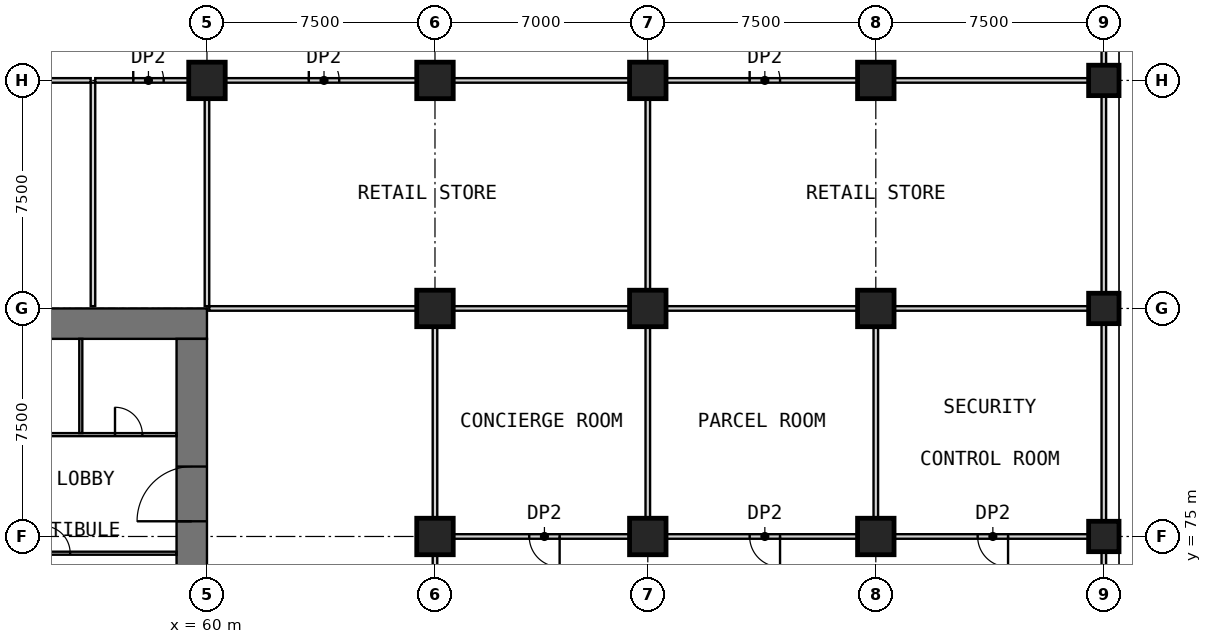
"""IFC4 building model, lengths in metres.
Left out: names, types, materials, properties, quantities, classifications, styles, units other than length and angle.
Written with IfcOpenShell. Run it as: python <this file> out.ifc"""

import sys

from ifc_helpers import new_model, si_unit, direction, frame, frame_2d, origin, origin_2d, place, context, subcontext, project, spatial, rectangle, extrude, element, fill, save


model = new_model("IFC4")
c1 = context("Model", 3, precision=1e-05, world=origin(), true_north=direction((0.0, 1.0)))
c2 = subcontext(c1, "Body", "Model", "MODEL_VIEW")
j1 = project(units=[si_unit("LENGTHUNIT", "METRE"), si_unit("PLANEANGLEUNIT", "RADIAN")], contexts=[c1])
p1 = place(None, origin())
s1 = spatial("IfcSite", under=j1, at=p1, CompositionType="ELEMENT")
p2 = place(p1, origin())
s2 = spatial("IfcBuilding", under=s1, at=p2, CompositionType="ELEMENT")
p3 = place(p2, origin())
s3 = spatial("IfcBuildingStorey", under=s2, at=p3, CompositionType="ELEMENT", Elevation=0.0)
for number, where, z_axis, x_axis in (
    (1, (60.0, 90.0, 0.0), (0.0, 0.0, 1.0), (1.0, 0.0, 0.0)),
    (2, (67.5, 75.0, 0.0), (0.0, 0.0, 1.0), (1.0, 0.0, 0.0)),
    (3, (67.5, 82.5, 0.0), (0.0, 0.0, 1.0), (1.0, 0.0, 0.0)),
    (4, (67.5, 90.0, 0.0), (0.0, 0.0, 1.0), (1.0, 0.0, 0.0)),
    (5, (74.5, 75.0, 0.0), (0.0, 0.0, 1.0), (1.0, 0.0, 0.0)),
    (6, (74.5, 82.5, 0.0), (0.0, 0.0, 1.0), (1.0, 0.0, 0.0)),
    (7, (74.5, 90.0, 0.0), (0.0, 0.0, 1.0), (1.0, 0.0, 0.0)),
    (8, (82.0, 75.0, 0.0), (0.0, 0.0, 1.0), (1.0, 0.0, 0.0)),
    (9, (82.0, 82.5, 0.0), (0.0, 0.0, 1.0), (1.0, 0.0, 0.0)),
    (10, (82.0, 90.0, 0.0), (0.0, 0.0, 1.0), (1.0, 0.0, 0.0)),
):
    element("IfcColumn", number, at=place(p3, frame(where, z_axis=z_axis, x_axis=x_axis)), inside=s3, PredefinedType="COLUMN", context=c2, shape_type="SweptSolid", body=[
        extrude(rectangle(XDim=1.2, YDim=1.2, at=origin_2d()), origin(), (0.0, 0.0, 1.0), 8.0),
    ])
for number, where, z_axis, x_axis in (
    (11, (89.5, 75.0, 0.0), (0.0, 0.0, 1.0), (1.0, 0.0, 0.0)),
    (12, (89.5, 82.5, 0.0), (0.0, 0.0, 1.0), (1.0, 0.0, 0.0)),
    (13, (89.5, 90.0, 0.0), (0.0, 0.0, 1.0), (1.0, 0.0, 0.0)),
):
    element("IfcColumn", number, at=place(p3, frame(where, z_axis=z_axis, x_axis=x_axis)), inside=s3, PredefinedType="COLUMN", context=c2, shape_type="SweptSolid", body=[
        extrude(rectangle(XDim=1.0, YDim=1.0, at=origin_2d()), origin(), (0.0, 0.0, 1.0), 8.0),
    ])
p4 = place(p3, frame((30.0, 82.0, 0.0), z_axis=(0.0, 0.0, 1.0), x_axis=(1.0, 0.0, 0.0)))
e14 = element("IfcWall", 14, at=p4, inside=s3, PredefinedType="SHEAR", context=c2, shape_type="SweptSolid", body=[
    extrude(rectangle(XDim=30.0, YDim=1.0, at=frame_2d((15.0, 0.0))), origin(), (0.0, 0.0, 1.0), 8.0),
])
p5 = place(p3, frame((59.5, 61.0, 0.0), z_axis=(0.0, 0.0, 1.0), x_axis=(0.0, 1.0, 0.0)))
e15 = element("IfcWall", 15, at=p5, inside=s3, PredefinedType="SHEAR", context=c2, shape_type="SweptSolid", body=[
    extrude(rectangle(XDim=20.5, YDim=1.0, at=frame_2d((10.25, 0.0))), origin(), (0.0, 0.0, 1.0), 8.0),
])
p6 = place(p5, frame((14.5, 0.0, 0.0)))
e16 = element("IfcOpeningElement", 16, at=p6, cuts=e15, PredefinedType="OPENING", context=c2, shape_type="SweptSolid", body=[
    extrude(rectangle(XDim=1.8, YDim=2.1, at=frame_2d((0.9, 1.05))), frame((0.0, 0.51, 0.0), z_axis=(0.0, -1.0, 0.0), x_axis=(1.0, 0.0, 0.0)), (0.0, 0.0, 1.0), 1.02),
])
p7 = place(p3, frame((51.1, 74.45, 0.0), z_axis=(0.0, 0.0, 1.0), x_axis=(1.0, 0.0, 0.0)))
e17 = element("IfcWall", 17, at=p7, inside=s3, PredefinedType="PARTITIONING", context=c2, shape_type="SweptSolid", body=[
    extrude(rectangle(XDim=7.9, YDim=0.1, at=frame_2d((3.95, 0.0))), origin(), (0.0, 0.0, 1.0), 7.7),
])
p8 = place(p7, frame((3.5, 0.0, 0.0)))
e18 = element("IfcOpeningElement", 18, at=p8, cuts=e17, PredefinedType="OPENING", context=c2, shape_type="SweptSolid", body=[
    extrude(rectangle(XDim=0.9, YDim=2.1, at=frame_2d((0.45, 1.05))), frame((0.0, 0.06, 0.0), z_axis=(0.0, -1.0, 0.0), x_axis=(1.0, 0.0, 0.0)), (0.0, 0.0, 1.0), 0.12),
])
p9 = place(p3, frame((51.1, 78.35, 0.0), z_axis=(0.0, 0.0, 1.0), x_axis=(1.0, 0.0, 0.0)))
e19 = element("IfcWall", 19, at=p9, inside=s3, PredefinedType="PARTITIONING", context=c2, shape_type="SweptSolid", body=[
    extrude(rectangle(XDim=7.9, YDim=0.1, at=frame_2d((3.95, 0.0))), origin(), (0.0, 0.0, 1.0), 7.7),
])
p10 = place(p9, frame((1.925, 0.0, 0.0)))
e20 = element("IfcOpeningElement", 20, at=p10, cuts=e19, PredefinedType="OPENING", context=c2, shape_type="SweptSolid", body=[
    extrude(rectangle(XDim=0.9, YDim=2.1, at=frame_2d((0.45, 1.05))), frame((0.0, 0.06, 0.0), z_axis=(0.0, -1.0, 0.0), x_axis=(1.0, 0.0, 0.0)), (0.0, 0.0, 1.0), 0.12),
])
p11 = place(p9, frame((5.875, 0.0, 0.0)))
e21 = element("IfcOpeningElement", 21, at=p11, cuts=e19, PredefinedType="OPENING", context=c2, shape_type="SweptSolid", body=[
    extrude(rectangle(XDim=0.9, YDim=2.1, at=frame_2d((0.45, 1.05))), frame((0.0, 0.06, 0.0), z_axis=(0.0, -1.0, 0.0), x_axis=(1.0, 0.0, 0.0)), (0.0, 0.0, 1.0), 0.12),
])
p12 = place(p3, frame((55.85, 78.4, 0.0), z_axis=(0.0, 0.0, 1.0), x_axis=(0.0, 1.0, 0.0)))
e22 = element("IfcWall", 22, at=p12, inside=s3, PredefinedType="PARTITIONING", context=c2, shape_type="SweptSolid", body=[
    extrude(rectangle(XDim=3.1, YDim=0.1, at=frame_2d((1.55, 0.0))), origin(), (0.0, 0.0, 1.0), 7.7),
])
p13 = place(p3, frame((53.1, 90.0, 0.0), z_axis=(0.0, 0.0, 1.0), x_axis=(1.0, 0.0, 0.0)))
e23 = element("IfcWall", 23, at=p13, inside=s3, PredefinedType="PARTITIONING", context=c2, shape_type="SweptSolid", body=[
    extrude(rectangle(XDim=3.075, YDim=0.15, at=frame_2d((1.538, 0.0))), origin(), (0.0, 0.0, 1.0), 7.7),
])
p14 = place(p13, frame((0.75, 0.0, 0.0)))
e24 = element("IfcOpeningElement", 24, at=p14, cuts=e23, PredefinedType="OPENING", context=c2, shape_type="SweptSolid", body=[
    extrude(rectangle(XDim=1.0, YDim=2.1, at=frame_2d((0.5, 1.05))), frame((0.0, 0.085, 0.0), z_axis=(0.0, -1.0, 0.0), x_axis=(1.0, 0.0, 0.0)), (0.0, 0.0, 1.0), 0.17),
])
p15 = place(p3, frame((56.325, 90.0, 0.0), z_axis=(0.0, 0.0, 1.0), x_axis=(1.0, 0.0, 0.0)))
e25 = element("IfcWall", 25, at=p15, inside=s3, PredefinedType="PARTITIONING", context=c2, shape_type="SweptSolid", body=[
    extrude(rectangle(XDim=3.075, YDim=0.15, at=frame_2d((1.538, 0.0))), origin(), (0.0, 0.0, 1.0), 7.7),
])
p16 = place(p15, frame((1.25, 0.0, 0.0)))
e26 = element("IfcOpeningElement", 26, at=p16, cuts=e25, PredefinedType="OPENING", context=c2, shape_type="SweptSolid", body=[
    extrude(rectangle(XDim=1.0, YDim=2.1, at=frame_2d((0.5, 1.05))), frame((0.0, 0.085, 0.0), z_axis=(0.0, -1.0, 0.0), x_axis=(1.0, 0.0, 0.0)), (0.0, 0.0, 1.0), 0.17),
])
p17 = place(p3, frame((60.6, 90.0, 0.0), z_axis=(0.0, 0.0, 1.0), x_axis=(1.0, 0.0, 0.0)))
e27 = element("IfcWall", 27, at=p17, inside=s3, PredefinedType="PARTITIONING", context=c2, shape_type="SweptSolid", body=[
    extrude(rectangle(XDim=6.3, YDim=0.15, at=frame_2d((3.15, 0.0))), origin(), (0.0, 0.0, 1.0), 7.7),
])
p18 = place(p17, frame((2.75, 0.0, 0.0)))
e28 = element("IfcOpeningElement", 28, at=p18, cuts=e27, PredefinedType="OPENING", context=c2, shape_type="SweptSolid", body=[
    extrude(rectangle(XDim=1.0, YDim=2.1, at=frame_2d((0.5, 1.05))), frame((0.0, 0.085, 0.0), z_axis=(0.0, -1.0, 0.0), x_axis=(1.0, 0.0, 0.0)), (0.0, 0.0, 1.0), 0.17),
])
p19 = place(p3, frame((68.1, 90.0, 0.0), z_axis=(0.0, 0.0, 1.0), x_axis=(1.0, 0.0, 0.0)))
e29 = element("IfcWall", 29, at=p19, inside=s3, PredefinedType="PARTITIONING", context=c2, shape_type="SweptSolid", body=[
    extrude(rectangle(XDim=5.8, YDim=0.15, at=frame_2d((2.9, 0.0))), origin(), (0.0, 0.0, 1.0), 7.7),
])
p20 = place(p3, frame((75.1, 90.0, 0.0), z_axis=(0.0, 0.0, 1.0), x_axis=(1.0, 0.0, 0.0)))
e30 = element("IfcWall", 30, at=p20, inside=s3, PredefinedType="PARTITIONING", context=c2, shape_type="SweptSolid", body=[
    extrude(rectangle(XDim=6.3, YDim=0.15, at=frame_2d((3.15, 0.0))), origin(), (0.0, 0.0, 1.0), 7.7),
])
p21 = place(p20, frame((2.75, 0.0, 0.0)))
e31 = element("IfcOpeningElement", 31, at=p21, cuts=e30, PredefinedType="OPENING", context=c2, shape_type="SweptSolid", body=[
    extrude(rectangle(XDim=1.0, YDim=2.1, at=frame_2d((0.5, 1.05))), frame((0.0, 0.085, 0.0), z_axis=(0.0, -1.0, 0.0), x_axis=(1.0, 0.0, 0.0)), (0.0, 0.0, 1.0), 0.17),
])
p22 = place(p3, frame((82.6, 90.0, 0.0), z_axis=(0.0, 0.0, 1.0), x_axis=(1.0, 0.0, 0.0)))
e32 = element("IfcWall", 32, at=p22, inside=s3, PredefinedType="PARTITIONING", context=c2, shape_type="SweptSolid", body=[
    extrude(rectangle(XDim=6.4, YDim=0.15, at=frame_2d((3.2, 0.0))), origin(), (0.0, 0.0, 1.0), 7.7),
])
p23 = place(p3, frame((60.075, 82.5, 0.0), z_axis=(0.0, 0.0, 1.0), x_axis=(1.0, 0.0, 0.0)))
e33 = element("IfcWall", 33, at=p23, inside=s3, PredefinedType="PARTITIONING", context=c2, shape_type="SweptSolid", body=[
    extrude(rectangle(XDim=6.825, YDim=0.15, at=frame_2d((3.413, 0.0))), origin(), (0.0, 0.0, 1.0), 7.7),
])
p24 = place(p3, frame((68.1, 82.5, 0.0), z_axis=(0.0, 0.0, 1.0), x_axis=(1.0, 0.0, 0.0)))
e34 = element("IfcWall", 34, at=p24, inside=s3, PredefinedType="PARTITIONING", context=c2, shape_type="SweptSolid", body=[
    extrude(rectangle(XDim=5.8, YDim=0.15, at=frame_2d((2.9, 0.0))), origin(), (0.0, 0.0, 1.0), 7.7),
])
p25 = place(p3, frame((75.1, 82.5, 0.0), z_axis=(0.0, 0.0, 1.0), x_axis=(1.0, 0.0, 0.0)))
e35 = element("IfcWall", 35, at=p25, inside=s3, PredefinedType="PARTITIONING", context=c2, shape_type="SweptSolid", body=[
    extrude(rectangle(XDim=6.3, YDim=0.15, at=frame_2d((3.15, 0.0))), origin(), (0.0, 0.0, 1.0), 7.7),
])
p26 = place(p3, frame((82.6, 82.5, 0.0), z_axis=(0.0, 0.0, 1.0), x_axis=(1.0, 0.0, 0.0)))
e36 = element("IfcWall", 36, at=p26, inside=s3, PredefinedType="PARTITIONING", context=c2, shape_type="SweptSolid", body=[
    extrude(rectangle(XDim=6.4, YDim=0.15, at=frame_2d((3.2, 0.0))), origin(), (0.0, 0.0, 1.0), 7.7),
])
p27 = place(p3, frame((73.9, 75.0, 0.0), z_axis=(0.0, 0.0, 1.0), x_axis=(-1.0, 0.0, 0.0)))
e37 = element("IfcWall", 37, at=p27, inside=s3, PredefinedType="PARTITIONING", context=c2, shape_type="SweptSolid", body=[
    extrude(rectangle(XDim=5.8, YDim=0.15, at=frame_2d((2.9, 0.0))), origin(), (0.0, 0.0, 1.0), 7.7),
])
p28 = place(p27, frame((2.3, 0.0, 0.0)))
e38 = element("IfcOpeningElement", 38, at=p28, cuts=e37, PredefinedType="OPENING", context=c2, shape_type="SweptSolid", body=[
    extrude(rectangle(XDim=1.0, YDim=2.1, at=frame_2d((0.5, 1.05))), frame((0.0, 0.085, 0.0), z_axis=(0.0, -1.0, 0.0), x_axis=(1.0, 0.0, 0.0)), (0.0, 0.0, 1.0), 0.17),
])
p29 = place(p3, frame((81.4, 75.0, 0.0), z_axis=(0.0, 0.0, 1.0), x_axis=(-1.0, 0.0, 0.0)))
e39 = element("IfcWall", 39, at=p29, inside=s3, PredefinedType="PARTITIONING", context=c2, shape_type="SweptSolid", body=[
    extrude(rectangle(XDim=6.3, YDim=0.15, at=frame_2d((3.15, 0.0))), origin(), (0.0, 0.0, 1.0), 7.7),
])
p30 = place(p29, frame((2.55, 0.0, 0.0)))
e40 = element("IfcOpeningElement", 40, at=p30, cuts=e39, PredefinedType="OPENING", context=c2, shape_type="SweptSolid", body=[
    extrude(rectangle(XDim=1.0, YDim=2.1, at=frame_2d((0.5, 1.05))), frame((0.0, 0.085, 0.0), z_axis=(0.0, -1.0, 0.0), x_axis=(1.0, 0.0, 0.0)), (0.0, 0.0, 1.0), 0.17),
])
p31 = place(p3, frame((89.0, 75.0, 0.0), z_axis=(0.0, 0.0, 1.0), x_axis=(-1.0, 0.0, 0.0)))
e41 = element("IfcWall", 41, at=p31, inside=s3, PredefinedType="PARTITIONING", context=c2, shape_type="SweptSolid", body=[
    extrude(rectangle(XDim=6.4, YDim=0.15, at=frame_2d((3.2, 0.0))), origin(), (0.0, 0.0, 1.0), 7.7),
])
p32 = place(p31, frame((2.65, 0.0, 0.0)))
e42 = element("IfcOpeningElement", 42, at=p32, cuts=e41, PredefinedType="OPENING", context=c2, shape_type="SweptSolid", body=[
    extrude(rectangle(XDim=1.0, YDim=2.1, at=frame_2d((0.5, 1.05))), frame((0.0, 0.085, 0.0), z_axis=(0.0, -1.0, 0.0), x_axis=(1.0, 0.0, 0.0)), (0.0, 0.0, 1.0), 0.17),
])
p33 = place(p3, frame((60.0, 82.575, 0.0), z_axis=(0.0, 0.0, 1.0), x_axis=(0.0, 1.0, 0.0)))
e43 = element("IfcWall", 43, at=p33, inside=s3, PredefinedType="PARTITIONING", context=c2, shape_type="SweptSolid", body=[
    extrude(rectangle(XDim=6.825, YDim=0.15, at=frame_2d((3.413, 0.0))), origin(), (0.0, 0.0, 1.0), 7.7),
])
p34 = place(p3, frame((89.5, 74.5, 0.0), z_axis=(0.0, 0.0, 1.0), x_axis=(0.0, -1.0, 0.0)))
e44 = element("IfcWall", 44, at=p34, inside=s3, PredefinedType="PARTITIONING", context=c2, shape_type="SweptSolid", body=[
    extrude(rectangle(XDim=6.5, YDim=0.15, at=frame_2d((3.25, 0.0))), origin(), (0.0, 0.0, 1.0), 7.7),
])
p35 = place(p34, frame((2.45, 0.0, 0.0)))
e45 = element("IfcOpeningElement", 45, at=p35, cuts=e44, PredefinedType="OPENING", context=c2, shape_type="SweptSolid", body=[
    extrude(rectangle(XDim=1.8, YDim=2.4, at=frame_2d((0.9, 1.2))), frame((0.0, 0.085, 0.0), z_axis=(0.0, -1.0, 0.0), x_axis=(1.0, 0.0, 0.0)), (0.0, 0.0, 1.0), 0.17),
])
for number, where, z_axis, x_axis in (
    (46, (89.5, 75.5, 0.0), (0.0, 0.0, 1.0), (0.0, 1.0, 0.0)),
    (47, (89.5, 83.0, 0.0), (0.0, 0.0, 1.0), (0.0, 1.0, 0.0)),
):
    element("IfcWall", number, at=place(p3, frame(where, z_axis=z_axis, x_axis=x_axis)), inside=s3, PredefinedType="PARTITIONING", context=c2, shape_type="SweptSolid", body=[
        extrude(rectangle(XDim=6.5, YDim=0.15, at=frame_2d((3.25, 0.0))), origin(), (0.0, 0.0, 1.0), 7.7),
    ])
p36 = place(p3, frame((89.5, 96.5, 0.0), z_axis=(0.0, 0.0, 1.0), x_axis=(0.0, -1.0, 0.0)))
e48 = element("IfcWall", 48, at=p36, inside=s3, PredefinedType="PARTITIONING", context=c2, shape_type="SweptSolid", body=[
    extrude(rectangle(XDim=6.0, YDim=0.15, at=frame_2d((3.0, 0.0))), origin(), (0.0, 0.0, 1.0), 7.7),
])
p37 = place(p36, frame((2.2, 0.0, 0.0)))
e49 = element("IfcOpeningElement", 49, at=p37, cuts=e48, PredefinedType="OPENING", context=c2, shape_type="SweptSolid", body=[
    extrude(rectangle(XDim=1.8, YDim=2.4, at=frame_2d((0.9, 1.2))), frame((0.0, 0.085, 0.0), z_axis=(0.0, -1.0, 0.0), x_axis=(1.0, 0.0, 0.0)), (0.0, 0.0, 1.0), 0.17),
])
for number, where, z_axis, x_axis in (
    (50, (67.5, 68.1, 0.0), (0.0, 0.0, 1.0), (0.0, 1.0, 0.0)),
    (51, (67.5, 75.6, 0.0), (0.0, 0.0, 1.0), (0.0, 1.0, 0.0)),
    (52, (74.5, 75.6, 0.0), (0.0, 0.0, 1.0), (0.0, 1.0, 0.0)),
    (53, (74.5, 83.1, 0.0), (0.0, 0.0, 1.0), (0.0, 1.0, 0.0)),
    (54, (82.0, 75.6, 0.0), (0.0, 0.0, 1.0), (0.0, 1.0, 0.0)),
):
    element("IfcWall", number, at=place(p3, frame(where, z_axis=z_axis, x_axis=x_axis)), inside=s3, PredefinedType="PARTITIONING", context=c2, shape_type="SweptSolid", body=[
        extrude(rectangle(XDim=6.3, YDim=0.15, at=frame_2d((3.15, 0.0))), origin(), (0.0, 0.0, 1.0), 7.7),
    ])
p38 = place(p3, frame((56.25, 82.575, 0.0), z_axis=(0.0, 0.0, 1.0), x_axis=(0.0, 1.0, 0.0)))
e55 = element("IfcWall", 55, at=p38, inside=s3, PredefinedType="PARTITIONING", context=c2, shape_type="SweptSolid", body=[
    extrude(rectangle(XDim=7.35, YDim=0.15, at=frame_2d((3.675, 0.0))), origin(), (0.0, 0.0, 1.0), 7.7),
])
p39 = place(p6, origin())
e56 = element("IfcDoor", 56, at=p39, inside=s3, OperationType="DOUBLE_DOOR_SINGLE_SWING", PredefinedType="DOOR", context=c2, shape_type="SweptSolid", body=[
    extrude(rectangle(XDim=1.8, YDim=2.1, at=frame_2d((0.9, 1.05))), frame((0.0, 0.025, 0.0), z_axis=(0.0, -1.0, 0.0), x_axis=(1.0, 0.0, 0.0)), (0.0, 0.0, 1.0), 0.05),
])
fill(e16, e56)
p40 = place(p8, origin())
e57 = element("IfcDoor", 57, at=p40, inside=s3, OperationType="SINGLE_SWING_RIGHT", PredefinedType="DOOR", context=c2, shape_type="SweptSolid", body=[
    extrude(rectangle(XDim=0.9, YDim=2.1, at=frame_2d((0.45, 1.05))), frame((0.0, 0.025, 0.0), z_axis=(0.0, -1.0, 0.0), x_axis=(1.0, 0.0, 0.0)), (0.0, 0.0, 1.0), 0.05),
])
fill(e18, e57)
p41 = place(p11, origin())
e58 = element("IfcDoor", 58, at=p41, inside=s3, OperationType="SINGLE_SWING_LEFT", PredefinedType="DOOR", context=c2, shape_type="SweptSolid", body=[
    extrude(rectangle(XDim=0.9, YDim=2.1, at=frame_2d((0.45, 1.05))), frame((0.0, 0.025, 0.0), z_axis=(0.0, -1.0, 0.0), x_axis=(1.0, 0.0, 0.0)), (0.0, 0.0, 1.0), 0.05),
])
fill(e21, e58)
p42 = place(p16, origin())
e59 = element("IfcDoor", 59, at=p42, inside=s3, OperationType="SINGLE_SWING_LEFT", PredefinedType="DOOR", context=c2, shape_type="SweptSolid", body=[
    extrude(rectangle(XDim=1.0, YDim=2.1, at=frame_2d((0.5, 1.05))), frame((0.0, 0.025, 0.0), z_axis=(0.0, -1.0, 0.0), x_axis=(1.0, 0.0, 0.0)), (0.0, 0.0, 1.0), 0.05),
])
fill(e26, e59)
p43 = place(p18, origin())
e60 = element("IfcDoor", 60, at=p43, inside=s3, OperationType="SINGLE_SWING_LEFT", PredefinedType="DOOR", context=c2, shape_type="SweptSolid", body=[
    extrude(rectangle(XDim=1.0, YDim=2.1, at=frame_2d((0.5, 1.05))), frame((0.0, 0.025, 0.0), z_axis=(0.0, -1.0, 0.0), x_axis=(1.0, 0.0, 0.0)), (0.0, 0.0, 1.0), 0.05),
])
fill(e28, e60)
p44 = place(p21, origin())
e61 = element("IfcDoor", 61, at=p44, inside=s3, OperationType="SINGLE_SWING_LEFT", PredefinedType="DOOR", context=c2, shape_type="SweptSolid", body=[
    extrude(rectangle(XDim=1.0, YDim=2.1, at=frame_2d((0.5, 1.05))), frame((0.0, 0.025, 0.0), z_axis=(0.0, -1.0, 0.0), x_axis=(1.0, 0.0, 0.0)), (0.0, 0.0, 1.0), 0.05),
])
fill(e31, e61)
p45 = place(p28, origin())
e62 = element("IfcDoor", 62, at=p45, inside=s3, OperationType="SINGLE_SWING_LEFT", PredefinedType="DOOR", context=c2, shape_type="SweptSolid", body=[
    extrude(rectangle(XDim=1.0, YDim=2.1, at=frame_2d((0.5, 1.05))), frame((0.0, 0.025, 0.0), z_axis=(0.0, -1.0, 0.0), x_axis=(1.0, 0.0, 0.0)), (0.0, 0.0, 1.0), 0.05),
])
fill(e38, e62)
p46 = place(p30, origin())
e63 = element("IfcDoor", 63, at=p46, inside=s3, OperationType="SINGLE_SWING_LEFT", PredefinedType="DOOR", context=c2, shape_type="SweptSolid", body=[
    extrude(rectangle(XDim=1.0, YDim=2.1, at=frame_2d((0.5, 1.05))), frame((0.0, 0.025, 0.0), z_axis=(0.0, -1.0, 0.0), x_axis=(1.0, 0.0, 0.0)), (0.0, 0.0, 1.0), 0.05),
])
fill(e40, e63)
p47 = place(p32, origin())
e64 = element("IfcDoor", 64, at=p47, inside=s3, OperationType="SINGLE_SWING_LEFT", PredefinedType="DOOR", context=c2, shape_type="SweptSolid", body=[
    extrude(rectangle(XDim=1.0, YDim=2.1, at=frame_2d((0.5, 1.05))), frame((0.0, 0.025, 0.0), z_axis=(0.0, -1.0, 0.0), x_axis=(1.0, 0.0, 0.0)), (0.0, 0.0, 1.0), 0.05),
])
fill(e42, e64)
save(model, sys.argv[1])
